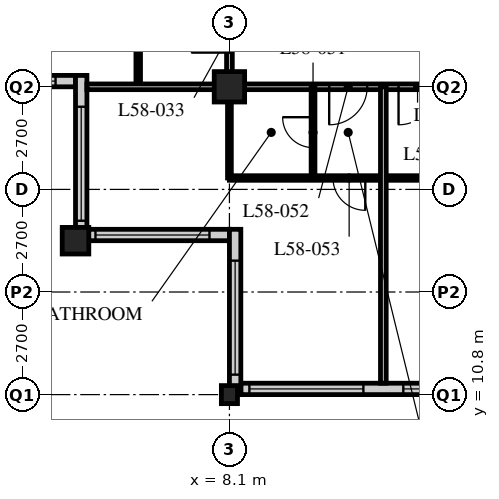
"""IFC4 building model, lengths in metres.
Left out: names, types, materials, properties, quantities, classifications, styles, units other than length and angle.
Written with IfcOpenShell. Run it as: python <this file> out.ifc"""

import sys

from ifc_helpers import new_model, si_unit, direction, frame, frame_2d, origin, origin_2d, place, context, subcontext, project, spatial, rectangle, hollow_rectangle, i_section, extrude, element, fill, save


model = new_model("IFC4")
c1 = context("Model", 3, precision=1e-05, world=origin(), true_north=direction((0.0, 1.0)))
c2 = subcontext(c1, "Body", "Model", "MODEL_VIEW")
j1 = project(units=[si_unit("LENGTHUNIT", "METRE"), si_unit("PLANEANGLEUNIT", "RADIAN")], contexts=[c1])
p1 = place(None, origin())
s1 = spatial("IfcSite", under=j1, at=p1, CompositionType="ELEMENT")
p2 = place(p1, origin())
s2 = spatial("IfcBuilding", under=s1, at=p2, CompositionType="ELEMENT")
p3 = place(p2, frame((0.0, 0.0, 224.4)))
s3 = spatial("IfcBuildingStorey", under=s2, at=p3, CompositionType="ELEMENT", Elevation=224.4)
p4 = place(p3, frame((4.05, 14.85, 0.0), z_axis=(0.0, 0.0, 1.0), x_axis=(1.0, 0.0, 0.0)))
e1 = element("IfcColumn", 1, at=p4, inside=s3, PredefinedType="COLUMN", context=c2, shape_type="SweptSolid", body=[
    extrude(hollow_rectangle(XDim=0.7, YDim=0.7, WallThickness=0.07, at=origin_2d()), origin(), (0.0, 0.0, 1.0), 3.6),
])
p5 = place(p3, frame((8.1, 10.8, 0.0), z_axis=(0.0, 0.0, 1.0), x_axis=(1.0, 0.0, 0.0)))
e2 = element("IfcColumn", 2, at=p5, inside=s3, PredefinedType="COLUMN", context=c2, shape_type="SweptSolid", body=[
    extrude(i_section(OverallWidth=0.424, OverallDepth=0.475, WebThickness=0.048, FlangeThickness=0.077, FilletRadius=0.015, at=origin_2d()), origin(), (0.0, 0.0, 1.0), 3.6),
])
p6 = place(p3, frame((8.1, 18.9, 0.0), z_axis=(0.0, 0.0, 1.0), x_axis=(1.0, 0.0, 0.0)))
e3 = element("IfcColumn", 3, at=p6, inside=s3, PredefinedType="COLUMN", context=c2, shape_type="SweptSolid", body=[
    extrude(hollow_rectangle(XDim=0.8, YDim=0.8, WallThickness=0.08, at=origin_2d()), origin(), (0.0, 0.0, 1.0), 3.6),
])
p7 = place(p3, frame((8.4, 10.95, 0.0), z_axis=(0.0, 0.0, 1.0), x_axis=(1.0, 0.0, 0.0)))
e4 = element("IfcWall", 4, at=p7, inside=s3, PredefinedType="SOLIDWALL", context=c2, shape_type="SweptSolid", body=[
    extrude(rectangle(XDim=40.2, YDim=0.3, at=frame_2d((20.1, 0.0))), origin(), (0.0, 0.0, 1.0), 3.39),
])
p8 = place(p7, frame((0.225, 0.0, 0.6)))
e5 = element("IfcOpeningElement", 5, at=p8, cuts=e4, PredefinedType="OPENING", context=c2, shape_type="SweptSolid", body=[
    extrude(rectangle(XDim=3.0, YDim=2.0, at=frame_2d((1.5, 1.0))), frame((0.0, 0.16, 0.0), z_axis=(0.0, -1.0, 0.0), x_axis=(1.0, 0.0, 0.0)), (0.0, 0.0, 1.0), 0.32),
])
p9 = place(p7, frame((4.275, 0.0, 0.6)))
e6 = element("IfcOpeningElement", 6, at=p9, cuts=e4, PredefinedType="OPENING", context=c2, shape_type="SweptSolid", body=[
    extrude(rectangle(XDim=3.0, YDim=2.0, at=frame_2d((1.5, 1.0))), frame((0.0, 0.16, 0.0), z_axis=(0.0, -1.0, 0.0), x_axis=(1.0, 0.0, 0.0)), (0.0, 0.0, 1.0), 0.32),
])
p10 = place(p7, frame((8.325, 0.0, 0.6)))
e7 = element("IfcOpeningElement", 7, at=p10, cuts=e4, PredefinedType="OPENING", context=c2, shape_type="SweptSolid", body=[
    extrude(rectangle(XDim=3.0, YDim=2.0, at=frame_2d((1.5, 1.0))), frame((0.0, 0.16, 0.0), z_axis=(0.0, -1.0, 0.0), x_axis=(1.0, 0.0, 0.0)), (0.0, 0.0, 1.0), 0.32),
])
p11 = place(p7, frame((12.375, 0.0, 0.6)))
e8 = element("IfcOpeningElement", 8, at=p11, cuts=e4, PredefinedType="OPENING", context=c2, shape_type="SweptSolid", body=[
    extrude(rectangle(XDim=3.0, YDim=2.0, at=frame_2d((1.5, 1.0))), frame((0.0, 0.16, 0.0), z_axis=(0.0, -1.0, 0.0), x_axis=(1.0, 0.0, 0.0)), (0.0, 0.0, 1.0), 0.32),
])
p12 = place(p7, frame((16.425, 0.0, 0.6)))
e9 = element("IfcOpeningElement", 9, at=p12, cuts=e4, PredefinedType="OPENING", context=c2, shape_type="SweptSolid", body=[
    extrude(rectangle(XDim=3.0, YDim=2.0, at=frame_2d((1.5, 1.0))), frame((0.0, 0.16, 0.0), z_axis=(0.0, -1.0, 0.0), x_axis=(1.0, 0.0, 0.0)), (0.0, 0.0, 1.0), 0.32),
])
p13 = place(p7, frame((20.475, 0.0, 0.6)))
e10 = element("IfcOpeningElement", 10, at=p13, cuts=e4, PredefinedType="OPENING", context=c2, shape_type="SweptSolid", body=[
    extrude(rectangle(XDim=3.0, YDim=2.0, at=frame_2d((1.5, 1.0))), frame((0.0, 0.16, 0.0), z_axis=(0.0, -1.0, 0.0), x_axis=(1.0, 0.0, 0.0)), (0.0, 0.0, 1.0), 0.32),
])
p14 = place(p7, frame((24.525, 0.0, 0.6)))
e11 = element("IfcOpeningElement", 11, at=p14, cuts=e4, PredefinedType="OPENING", context=c2, shape_type="SweptSolid", body=[
    extrude(rectangle(XDim=3.0, YDim=2.0, at=frame_2d((1.5, 1.0))), frame((0.0, 0.16, 0.0), z_axis=(0.0, -1.0, 0.0), x_axis=(1.0, 0.0, 0.0)), (0.0, 0.0, 1.0), 0.32),
])
p15 = place(p7, frame((28.575, 0.0, 0.6)))
e12 = element("IfcOpeningElement", 12, at=p15, cuts=e4, PredefinedType="OPENING", context=c2, shape_type="SweptSolid", body=[
    extrude(rectangle(XDim=3.0, YDim=2.0, at=frame_2d((1.5, 1.0))), frame((0.0, 0.16, 0.0), z_axis=(0.0, -1.0, 0.0), x_axis=(1.0, 0.0, 0.0)), (0.0, 0.0, 1.0), 0.32),
])
p16 = place(p7, frame((32.625, 0.0, 0.6)))
e13 = element("IfcOpeningElement", 13, at=p16, cuts=e4, PredefinedType="OPENING", context=c2, shape_type="SweptSolid", body=[
    extrude(rectangle(XDim=3.0, YDim=2.0, at=frame_2d((1.5, 1.0))), frame((0.0, 0.16, 0.0), z_axis=(0.0, -1.0, 0.0), x_axis=(1.0, 0.0, 0.0)), (0.0, 0.0, 1.0), 0.32),
])
p17 = place(p7, frame((36.675, 0.0, 0.6)))
e14 = element("IfcOpeningElement", 14, at=p17, cuts=e4, PredefinedType="OPENING", context=c2, shape_type="SweptSolid", body=[
    extrude(rectangle(XDim=3.0, YDim=2.0, at=frame_2d((1.5, 1.0))), frame((0.0, 0.16, 0.0), z_axis=(0.0, -1.0, 0.0), x_axis=(1.0, 0.0, 0.0)), (0.0, 0.0, 1.0), 0.32),
])
p18 = place(p3, frame((0.3, 19.05, 0.0), z_axis=(0.0, 0.0, 1.0), x_axis=(1.0, 0.0, 0.0)))
e15 = element("IfcWall", 15, at=p18, inside=s3, PredefinedType="SOLIDWALL", context=c2, shape_type="SweptSolid", body=[
    extrude(rectangle(XDim=3.75, YDim=0.3, at=frame_2d((1.875, 0.0))), origin(), (0.0, 0.0, 1.0), 3.39),
])
p19 = place(p18, frame((0.225, 0.0, 0.6)))
e16 = element("IfcOpeningElement", 16, at=p19, cuts=e15, PredefinedType="OPENING", context=c2, shape_type="SweptSolid", body=[
    extrude(rectangle(XDim=3.0, YDim=2.0, at=frame_2d((1.5, 1.0))), frame((0.0, 0.16, 0.0), z_axis=(0.0, -1.0, 0.0), x_axis=(1.0, 0.0, 0.0)), (0.0, 0.0, 1.0), 0.32),
])
p20 = place(p3, frame((4.2, 19.2, 0.0), z_axis=(0.0, 0.0, 1.0), x_axis=(0.0, -1.0, 0.0)))
e17 = element("IfcWall", 17, at=p20, inside=s3, PredefinedType="SOLIDWALL", context=c2, shape_type="SweptSolid", body=[
    extrude(rectangle(XDim=4.35, YDim=0.3, at=frame_2d((2.175, 0.0))), origin(), (0.0, 0.0, 1.0), 3.39),
])
p21 = place(p20, frame((0.825, 0.0, 0.6)))
e18 = element("IfcOpeningElement", 18, at=p21, cuts=e17, PredefinedType="OPENING", context=c2, shape_type="SweptSolid", body=[
    extrude(rectangle(XDim=3.0, YDim=2.0, at=frame_2d((1.5, 1.0))), frame((0.0, 0.16, 0.0), z_axis=(0.0, -1.0, 0.0), x_axis=(1.0, 0.0, 0.0)), (0.0, 0.0, 1.0), 0.32),
])
p22 = place(p3, frame((4.35, 15.0, 0.0), z_axis=(0.0, 0.0, 1.0), x_axis=(1.0, 0.0, 0.0)))
e19 = element("IfcWall", 19, at=p22, inside=s3, PredefinedType="SOLIDWALL", context=c2, shape_type="SweptSolid", body=[
    extrude(rectangle(XDim=3.75, YDim=0.3, at=frame_2d((1.875, 0.0))), origin(), (0.0, 0.0, 1.0), 3.39),
])
p23 = place(p22, frame((0.225, 0.0, 0.6)))
e20 = element("IfcOpeningElement", 20, at=p23, cuts=e19, PredefinedType="OPENING", context=c2, shape_type="SweptSolid", body=[
    extrude(rectangle(XDim=3.0, YDim=2.0, at=frame_2d((1.5, 1.0))), frame((0.0, 0.16, 0.0), z_axis=(0.0, -1.0, 0.0), x_axis=(1.0, 0.0, 0.0)), (0.0, 0.0, 1.0), 0.32),
])
p24 = place(p3, frame((8.25, 15.15, 0.0), z_axis=(0.0, 0.0, 1.0), x_axis=(0.0, -1.0, 0.0)))
e21 = element("IfcWall", 21, at=p24, inside=s3, PredefinedType="SOLIDWALL", context=c2, shape_type="SweptSolid", body=[
    extrude(rectangle(XDim=4.35, YDim=0.3, at=frame_2d((2.175, 0.0))), origin(), (0.0, 0.0, 1.0), 3.39),
])
p25 = place(p24, frame((0.825, 0.0, 0.6)))
e22 = element("IfcOpeningElement", 22, at=p25, cuts=e21, PredefinedType="OPENING", context=c2, shape_type="SweptSolid", body=[
    extrude(rectangle(XDim=3.0, YDim=2.0, at=frame_2d((1.5, 1.0))), frame((0.0, 0.16, 0.0), z_axis=(0.0, -1.0, 0.0), x_axis=(1.0, 0.0, 0.0)), (0.0, 0.0, 1.0), 0.32),
])
p26 = place(p3, frame((8.1, 18.9, 0.0), z_axis=(0.0, 0.0, 1.0), x_axis=(1.0, 0.0, 0.0)))
e23 = element("IfcWall", 23, at=p26, inside=s3, PredefinedType="PARTITIONING", context=c2, shape_type="SweptSolid", body=[
    extrude(rectangle(XDim=36.45, YDim=0.15, at=frame_2d((18.225, 0.0))), origin(), (0.0, 0.0, 1.0), 2.628),
])
p27 = place(p26, frame((4.45, 0.0, 0.0)))
e24 = element("IfcOpeningElement", 24, at=p27, cuts=e23, PredefinedType="OPENING", context=c2, shape_type="SweptSolid", body=[
    extrude(rectangle(XDim=1.0, YDim=2.1, at=frame_2d((0.5, 1.05))), frame((0.0, 0.085, 0.0), z_axis=(0.0, -1.0, 0.0), x_axis=(1.0, 0.0, 0.0)), (0.0, 0.0, 1.0), 0.17),
])
p28 = place(p26, frame((17.1, 0.0, 0.0)))
e25 = element("IfcOpeningElement", 25, at=p28, cuts=e23, PredefinedType="OPENING", context=c2, shape_type="SweptSolid", body=[
    extrude(rectangle(XDim=1.0, YDim=2.1, at=frame_2d((0.5, 1.05))), frame((0.0, 0.085, 0.0), z_axis=(0.0, -1.0, 0.0), x_axis=(1.0, 0.0, 0.0)), (0.0, 0.0, 1.0), 0.17),
])
p29 = place(p26, frame((29.05, 0.0, 0.0)))
e26 = element("IfcOpeningElement", 26, at=p29, cuts=e23, PredefinedType="OPENING", context=c2, shape_type="SweptSolid", body=[
    extrude(rectangle(XDim=1.0, YDim=2.1, at=frame_2d((0.5, 1.05))), frame((0.0, 0.085, 0.0), z_axis=(0.0, -1.0, 0.0), x_axis=(1.0, 0.0, 0.0)), (0.0, 0.0, 1.0), 0.17),
])
p30 = place(p26, frame((2.625, 0.0, 0.0)))
e27 = element("IfcOpeningElement", 27, at=p30, cuts=e23, PredefinedType="OPENING", context=c2, shape_type="SweptSolid", body=[
    extrude(rectangle(XDim=1.0, YDim=2.1, at=frame_2d((0.5, 1.05))), frame((0.0, 0.085, 0.0), z_axis=(0.0, -1.0, 0.0), x_axis=(1.0, 0.0, 0.0)), (0.0, 0.0, 1.0), 0.17),
])
p31 = place(p26, frame((33.925, 0.0, 0.0)))
e28 = element("IfcOpeningElement", 28, at=p31, cuts=e23, PredefinedType="OPENING", context=c2, shape_type="SweptSolid", body=[
    extrude(rectangle(XDim=1.0, YDim=2.1, at=frame_2d((0.5, 1.05))), frame((0.0, 0.085, 0.0), z_axis=(0.0, -1.0, 0.0), x_axis=(1.0, 0.0, 0.0)), (0.0, 0.0, 1.0), 0.17),
])
p32 = place(p3, frame((8.1, 18.9, 0.0), z_axis=(0.0, 0.0, 1.0), x_axis=(0.0, 1.0, 0.0)))
e29 = element("IfcWall", 29, at=p32, inside=s3, PredefinedType="PARTITIONING", context=c2, shape_type="SweptSolid", body=[
    extrude(rectangle(XDim=24.3, YDim=0.15, at=frame_2d((12.15, 0.0))), origin(), (0.0, 0.0, 1.0), 2.628),
])
p33 = place(p32, frame((0.9, 0.0, 0.0)))
e30 = element("IfcOpeningElement", 30, at=p33, cuts=e29, PredefinedType="OPENING", context=c2, shape_type="SweptSolid", body=[
    extrude(rectangle(XDim=1.0, YDim=2.1, at=frame_2d((0.5, 1.05))), frame((0.0, 0.085, 0.0), z_axis=(0.0, -1.0, 0.0), x_axis=(1.0, 0.0, 0.0)), (0.0, 0.0, 1.0), 0.17),
])
p34 = place(p32, frame((20.95, 0.0, 0.0)))
e31 = element("IfcOpeningElement", 31, at=p34, cuts=e29, PredefinedType="OPENING", context=c2, shape_type="SweptSolid", body=[
    extrude(rectangle(XDim=1.0, YDim=2.1, at=frame_2d((0.5, 1.05))), frame((0.0, 0.085, 0.0), z_axis=(0.0, -1.0, 0.0), x_axis=(1.0, 0.0, 0.0)), (0.0, 0.0, 1.0), 0.17),
])
p35 = place(p3, frame((5.7, 18.9, 0.0), z_axis=(0.0, 0.0, 1.0), x_axis=(0.0, 1.0, 0.0)))
e32 = element("IfcWall", 32, at=p35, inside=s3, PredefinedType="PARTITIONING", context=c2, shape_type="SweptSolid", body=[
    extrude(rectangle(XDim=20.25, YDim=0.12, at=frame_2d((10.125, 0.0))), origin(), (0.0, 0.0, 1.0), 3.39),
])
p36 = place(p35, frame((0.975, 0.0, 0.0)))
e33 = element("IfcOpeningElement", 33, at=p36, cuts=e32, PredefinedType="OPENING", context=c2, shape_type="SweptSolid", body=[
    extrude(rectangle(XDim=0.85, YDim=2.1, at=frame_2d((0.425, 1.05))), frame((0.0, 0.07, 0.0), z_axis=(0.0, -1.0, 0.0), x_axis=(1.0, 0.0, 0.0)), (0.0, 0.0, 1.0), 0.14),
])
p37 = place(p35, frame((8.425, 0.0, 0.0)))
e34 = element("IfcOpeningElement", 34, at=p37, cuts=e32, PredefinedType="OPENING", context=c2, shape_type="SweptSolid", body=[
    extrude(rectangle(XDim=0.85, YDim=2.1, at=frame_2d((0.425, 1.05))), frame((0.0, 0.07, 0.0), z_axis=(0.0, -1.0, 0.0), x_axis=(1.0, 0.0, 0.0)), (0.0, 0.0, 1.0), 0.14),
])
p38 = place(p35, frame((12.475, 0.0, 0.0)))
e35 = element("IfcOpeningElement", 35, at=p38, cuts=e32, PredefinedType="OPENING", context=c2, shape_type="SweptSolid", body=[
    extrude(rectangle(XDim=0.85, YDim=2.1, at=frame_2d((0.425, 1.05))), frame((0.0, 0.07, 0.0), z_axis=(0.0, -1.0, 0.0), x_axis=(1.0, 0.0, 0.0)), (0.0, 0.0, 1.0), 0.14),
])
p39 = place(p35, frame((16.525, 0.0, 0.0)))
e36 = element("IfcOpeningElement", 36, at=p39, cuts=e32, PredefinedType="OPENING", context=c2, shape_type="SweptSolid", body=[
    extrude(rectangle(XDim=0.85, YDim=2.1, at=frame_2d((0.425, 1.05))), frame((0.0, 0.07, 0.0), z_axis=(0.0, -1.0, 0.0), x_axis=(1.0, 0.0, 0.0)), (0.0, 0.0, 1.0), 0.14),
])
p40 = place(p3, frame((8.1, 16.5, 0.0), z_axis=(0.0, 0.0, 1.0), x_axis=(1.0, 0.0, 0.0)))
e37 = element("IfcWall", 37, at=p40, inside=s3, PredefinedType="PARTITIONING", context=c2, shape_type="SweptSolid", body=[
    extrude(rectangle(XDim=28.35, YDim=0.12, at=frame_2d((14.175, 0.0))), origin(), (0.0, 0.0, 1.0), 3.39),
])
p41 = place(p40, frame((5.025, 0.0, 0.0)))
e38 = element("IfcOpeningElement", 38, at=p41, cuts=e37, PredefinedType="OPENING", context=c2, shape_type="SweptSolid", body=[
    extrude(rectangle(XDim=0.85, YDim=2.1, at=frame_2d((0.425, 1.05))), frame((0.0, 0.07, 0.0), z_axis=(0.0, -1.0, 0.0), x_axis=(1.0, 0.0, 0.0)), (0.0, 0.0, 1.0), 0.14),
])
p42 = place(p40, frame((12.475, 0.0, 0.0)))
e39 = element("IfcOpeningElement", 39, at=p42, cuts=e37, PredefinedType="OPENING", context=c2, shape_type="SweptSolid", body=[
    extrude(rectangle(XDim=0.85, YDim=2.1, at=frame_2d((0.425, 1.05))), frame((0.0, 0.07, 0.0), z_axis=(0.0, -1.0, 0.0), x_axis=(1.0, 0.0, 0.0)), (0.0, 0.0, 1.0), 0.14),
])
p43 = place(p40, frame((17.175, 0.0, 0.0)))
e40 = element("IfcOpeningElement", 40, at=p43, cuts=e37, PredefinedType="OPENING", context=c2, shape_type="SweptSolid", body=[
    extrude(rectangle(XDim=0.85, YDim=2.1, at=frame_2d((0.425, 1.05))), frame((0.0, 0.07, 0.0), z_axis=(0.0, -1.0, 0.0), x_axis=(1.0, 0.0, 0.0)), (0.0, 0.0, 1.0), 0.14),
])
p44 = place(p40, frame((24.625, 0.0, 0.0)))
e41 = element("IfcOpeningElement", 41, at=p44, cuts=e37, PredefinedType="OPENING", context=c2, shape_type="SweptSolid", body=[
    extrude(rectangle(XDim=0.85, YDim=2.1, at=frame_2d((0.425, 1.05))), frame((0.0, 0.07, 0.0), z_axis=(0.0, -1.0, 0.0), x_axis=(1.0, 0.0, 0.0)), (0.0, 0.0, 1.0), 0.14),
])
p45 = place(p40, frame((2.725, 0.0, 0.0)))
e42 = element("IfcOpeningElement", 42, at=p45, cuts=e37, PredefinedType="OPENING", context=c2, shape_type="SweptSolid", body=[
    extrude(rectangle(XDim=0.85, YDim=2.1, at=frame_2d((0.425, 1.05))), frame((0.0, 0.07, 0.0), z_axis=(0.0, -1.0, 0.0), x_axis=(1.0, 0.0, 0.0)), (0.0, 0.0, 1.0), 0.14),
])
p46 = place(p3, frame((10.3, 18.9, 0.0), z_axis=(0.0, 0.0, 1.0), x_axis=(0.0, -1.0, 0.0)))
e43 = element("IfcWall", 43, at=p46, inside=s3, PredefinedType="PARTITIONING", context=c2, shape_type="SweptSolid", body=[
    extrude(rectangle(XDim=2.4, YDim=0.1, at=frame_2d((1.2, 0.0))), origin(), (0.0, 0.0, 1.0), 3.39),
])
p47 = place(p46, frame((0.8, 0.0, 0.0)))
e44 = element("IfcOpeningElement", 44, at=p47, cuts=e43, PredefinedType="OPENING", context=c2, shape_type="SweptSolid", body=[
    extrude(rectangle(XDim=0.8, YDim=2.1, at=frame_2d((0.4, 1.05))), frame((0.0, 0.06, 0.0), z_axis=(0.0, -1.0, 0.0), x_axis=(1.0, 0.0, 0.0)), (0.0, 0.0, 1.0), 0.12),
])
p48 = place(p3, frame((8.1, 18.9, 0.0), z_axis=(0.0, 0.0, 1.0), x_axis=(0.0, -1.0, 0.0)))
e45 = element("IfcWall", 45, at=p48, inside=s3, PredefinedType="PARTITIONING", context=c2, shape_type="SweptSolid", body=[
    extrude(rectangle(XDim=2.4, YDim=0.1, at=frame_2d((1.2, 0.0))), origin(), (0.0, 0.0, 1.0), 2.628),
])
p49 = place(p3, frame((4.35, 18.9, 0.0), z_axis=(0.0, 0.0, 1.0), x_axis=(1.0, 0.0, 0.0)))
e46 = element("IfcWall", 46, at=p49, inside=s3, PredefinedType="PARTITIONING", context=c2, shape_type="SweptSolid", body=[
    extrude(rectangle(XDim=3.75, YDim=0.15, at=frame_2d((1.875, 0.0))), origin(), (0.0, 0.0, 1.0), 2.628),
])
p50 = place(p3, frame((12.15, 18.9, 0.0), z_axis=(0.0, 0.0, 1.0), x_axis=(0.0, -1.0, 0.0)))
e47 = element("IfcWall", 47, at=p50, inside=s3, PredefinedType="PARTITIONING", context=c2, shape_type="SweptSolid", body=[
    extrude(rectangle(XDim=7.8, YDim=0.15, at=frame_2d((3.9, 0.0))), origin(), (0.0, 0.0, 1.0), 3.39),
])
p51 = place(p8, origin())
e48 = element("IfcWindow", 48, at=p51, inside=s3, PartitioningType="SINGLE_PANEL", PredefinedType="WINDOW", context=c2, shape_type="SweptSolid", body=[
    extrude(rectangle(XDim=3.0, YDim=2.0, at=frame_2d((1.5, 1.0))), frame((0.0, 0.03, 0.0), z_axis=(0.0, -1.0, 0.0), x_axis=(1.0, 0.0, 0.0)), (0.0, 0.0, 1.0), 0.06),
])
fill(e5, e48)
p52 = place(p9, origin())
e49 = element("IfcWindow", 49, at=p52, inside=s3, PartitioningType="SINGLE_PANEL", PredefinedType="WINDOW", context=c2, shape_type="SweptSolid", body=[
    extrude(rectangle(XDim=3.0, YDim=2.0, at=frame_2d((1.5, 1.0))), frame((0.0, 0.03, 0.0), z_axis=(0.0, -1.0, 0.0), x_axis=(1.0, 0.0, 0.0)), (0.0, 0.0, 1.0), 0.06),
])
fill(e6, e49)
p53 = place(p19, origin())
e50 = element("IfcWindow", 50, at=p53, inside=s3, PartitioningType="SINGLE_PANEL", PredefinedType="WINDOW", context=c2, shape_type="SweptSolid", body=[
    extrude(rectangle(XDim=3.0, YDim=2.0, at=frame_2d((1.5, 1.0))), frame((0.0, 0.03, 0.0), z_axis=(0.0, -1.0, 0.0), x_axis=(1.0, 0.0, 0.0)), (0.0, 0.0, 1.0), 0.06),
])
fill(e16, e50)
p54 = place(p21, origin())
e51 = element("IfcWindow", 51, at=p54, inside=s3, PartitioningType="SINGLE_PANEL", PredefinedType="WINDOW", context=c2, shape_type="SweptSolid", body=[
    extrude(rectangle(XDim=3.0, YDim=2.0, at=frame_2d((1.5, 1.0))), frame((0.0, 0.03, 0.0), z_axis=(0.0, -1.0, 0.0), x_axis=(1.0, 0.0, 0.0)), (0.0, 0.0, 1.0), 0.06),
])
fill(e18, e51)
p55 = place(p23, origin())
e52 = element("IfcWindow", 52, at=p55, inside=s3, PartitioningType="SINGLE_PANEL", PredefinedType="WINDOW", context=c2, shape_type="SweptSolid", body=[
    extrude(rectangle(XDim=3.0, YDim=2.0, at=frame_2d((1.5, 1.0))), frame((0.0, 0.03, 0.0), z_axis=(0.0, -1.0, 0.0), x_axis=(1.0, 0.0, 0.0)), (0.0, 0.0, 1.0), 0.06),
])
fill(e20, e52)
p56 = place(p25, origin())
e53 = element("IfcWindow", 53, at=p56, inside=s3, PartitioningType="SINGLE_PANEL", PredefinedType="WINDOW", context=c2, shape_type="SweptSolid", body=[
    extrude(rectangle(XDim=3.0, YDim=2.0, at=frame_2d((1.5, 1.0))), frame((0.0, 0.03, 0.0), z_axis=(0.0, -1.0, 0.0), x_axis=(1.0, 0.0, 0.0)), (0.0, 0.0, 1.0), 0.06),
])
fill(e22, e53)
p57 = place(p27, origin())
e54 = element("IfcDoor", 54, at=p57, inside=s3, OperationType="SINGLE_SWING_RIGHT", PredefinedType="DOOR", context=c2, shape_type="SweptSolid", body=[
    extrude(rectangle(XDim=1.0, YDim=2.1, at=frame_2d((0.5, 1.05))), frame((0.0, 0.025, 0.0), z_axis=(0.0, -1.0, 0.0), x_axis=(1.0, 0.0, 0.0)), (0.0, 0.0, 1.0), 0.05),
])
fill(e24, e54)
p58 = place(p33, origin())
e55 = element("IfcDoor", 55, at=p58, inside=s3, OperationType="SINGLE_SWING_LEFT", PredefinedType="DOOR", context=c2, shape_type="SweptSolid", body=[
    extrude(rectangle(XDim=1.0, YDim=2.1, at=frame_2d((0.5, 1.05))), frame((0.0, 0.025, 0.0), z_axis=(0.0, -1.0, 0.0), x_axis=(1.0, 0.0, 0.0)), (0.0, 0.0, 1.0), 0.05),
])
fill(e30, e55)
p59 = place(p47, origin())
e56 = element("IfcDoor", 56, at=p59, inside=s3, OperationType="SINGLE_SWING_RIGHT", PredefinedType="DOOR", context=c2, shape_type="SweptSolid", body=[
    extrude(rectangle(XDim=0.8, YDim=2.1, at=frame_2d((0.4, 1.05))), frame((0.0, 0.025, 0.0), z_axis=(0.0, -1.0, 0.0), x_axis=(1.0, 0.0, 0.0)), (0.0, 0.0, 1.0), 0.05),
])
fill(e44, e56)
p60 = place(p30, origin())
e57 = element("IfcDoor", 57, at=p60, inside=s3, OperationType="SINGLE_SWING_RIGHT", PredefinedType="DOOR", context=c2, shape_type="SweptSolid", body=[
    extrude(rectangle(XDim=1.0, YDim=2.1, at=frame_2d((0.5, 1.05))), frame((0.0, 0.025, 0.0), z_axis=(0.0, -1.0, 0.0), x_axis=(1.0, 0.0, 0.0)), (0.0, 0.0, 1.0), 0.05),
])
fill(e27, e57)
p61 = place(p45, origin())
e58 = element("IfcDoor", 58, at=p61, inside=s3, OperationType="SINGLE_SWING_LEFT", PredefinedType="DOOR", context=c2, shape_type="SweptSolid", body=[
    extrude(rectangle(XDim=0.85, YDim=2.1, at=frame_2d((0.425, 1.05))), frame((0.0, 0.025, 0.0), z_axis=(0.0, -1.0, 0.0), x_axis=(1.0, 0.0, 0.0)), (0.0, 0.0, 1.0), 0.05),
])
fill(e42, e58)
save(model, sys.argv[1])
